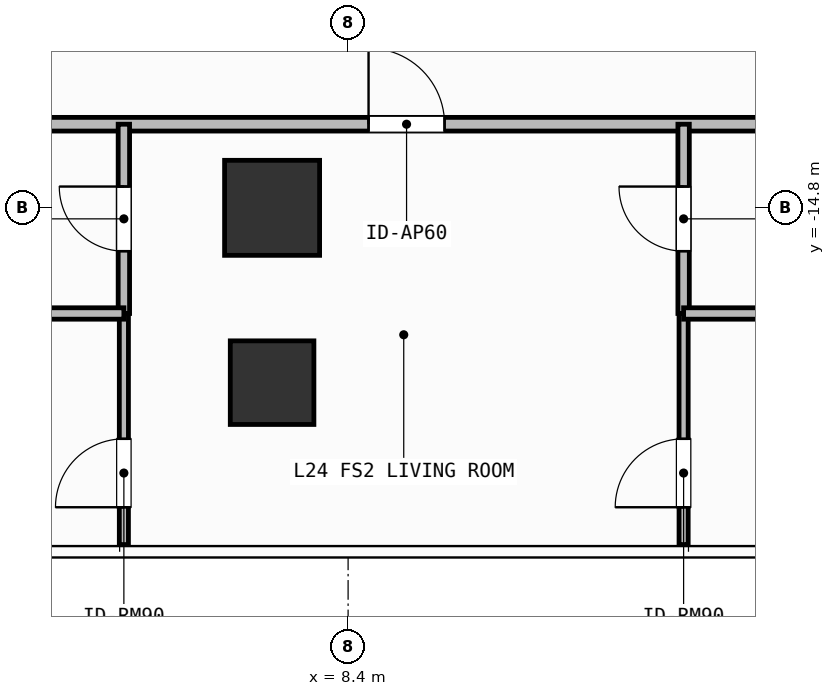
"""IFC4 building model, lengths in metres.
Left out: names, types, materials, properties, quantities, classifications, styles, units other than length and angle.
Written with IfcOpenShell. Run it as: python <this file> out.ifc"""

import sys

from ifc_helpers import new_model, si_unit, direction, frame, frame_2d, origin, origin_2d, place, context, subcontext, project, spatial, rectangle, extrude, element, fill, save


model = new_model("IFC4")
c1 = context("Model", 3, precision=1e-05, world=origin(), true_north=direction((0.0, 1.0)))
c2 = subcontext(c1, "Body", "Model", "MODEL_VIEW")
j1 = project(units=[si_unit("LENGTHUNIT", "METRE"), si_unit("PLANEANGLEUNIT", "RADIAN")], contexts=[c1])
p1 = place(None, origin())
s1 = spatial("IfcSite", under=j1, at=p1, CompositionType="ELEMENT")
p2 = place(p1, origin())
s2 = spatial("IfcBuilding", under=s1, at=p2, CompositionType="ELEMENT")
p3 = place(p2, frame((0.0, 0.0, 96.9)))
s3 = spatial("IfcBuildingStorey", under=s2, at=p3, CompositionType="ELEMENT", Elevation=96.9)
p4 = place(p3, frame((7.4, -14.8, 0.0), z_axis=(0.0, 0.0, 1.0), x_axis=(1.0, 0.0, 0.0)))
e1 = element("IfcColumn", 1, at=p4, inside=s3, PredefinedType="COLUMN", context=c2, shape_type="SweptSolid", body=[
    extrude(rectangle(XDim=1.25, YDim=1.25, at=origin_2d()), origin(), (0.0, 0.0, 1.0), 3.9),
])
p5 = place(p3, frame((7.4, -17.1, 0.0), z_axis=(0.0, 0.0, 1.0), x_axis=(1.0, 0.0, 0.0)))
e2 = element("IfcColumn", 2, at=p5, inside=s3, PredefinedType="COLUMN", context=c2, shape_type="SweptSolid", body=[
    extrude(rectangle(XDim=1.1, YDim=1.1, at=origin_2d()), origin(), (0.0, 0.0, 1.0), 3.9),
])
p6 = place(p3, frame((0.974, -13.7, 0.0), z_axis=(0.0, 0.0, 1.0), x_axis=(1.0, 0.0, 0.0)))
e3 = element("IfcWall", 3, at=p6, inside=s3, PredefinedType="PARTITIONING", context=c2, shape_type="SweptSolid", body=[
    extrude(rectangle(XDim=17.646, YDim=0.18, at=frame_2d((8.823, 0.0))), origin(), (0.0, 0.0, 1.0), 3.68),
])
p7 = place(p6, frame((7.695, 0.0, 0.0)))
e4 = element("IfcOpeningElement", 4, at=p7, cuts=e3, PredefinedType="OPENING", context=c2, shape_type="SweptSolid", body=[
    extrude(rectangle(XDim=1.0, YDim=2.2, at=frame_2d((0.5, 1.1))), frame((0.0, 0.1, 0.0), z_axis=(0.0, -1.0, 0.0), x_axis=(1.0, 0.0, 0.0)), (0.0, 0.0, 1.0), 0.2),
])
p8 = place(p3, frame((5.45, -16.19, 0.0), z_axis=(0.0, 0.0, 1.0), x_axis=(0.0, 1.0, 0.0)))
e5 = element("IfcWall", 5, at=p8, inside=s3, PredefinedType="PARTITIONING", context=c2, shape_type="SweptSolid", body=[
    extrude(rectangle(XDim=2.49, YDim=0.15, at=frame_2d((1.245, 0.0))), origin(), (0.0, 0.0, 1.0), 3.68),
])
p9 = place(p8, frame((0.82, 0.0, 0.0)))
e6 = element("IfcOpeningElement", 6, at=p9, cuts=e5, PredefinedType="OPENING", context=c2, shape_type="SweptSolid", body=[
    extrude(rectangle(XDim=0.85, YDim=2.1, at=frame_2d((0.425, 1.05))), frame((0.0, 0.085, 0.0), z_axis=(0.0, -1.0, 0.0), x_axis=(1.0, 0.0, 0.0)), (0.0, 0.0, 1.0), 0.17),
])
p10 = place(p3, frame((5.45, -19.23, 0.0), z_axis=(0.0, 0.0, 1.0), x_axis=(0.0, 1.0, 0.0)))
e7 = element("IfcWall", 7, at=p10, inside=s3, PredefinedType="PARTITIONING", context=c2, shape_type="SweptSolid", body=[
    extrude(rectangle(XDim=3.04, YDim=0.12, at=frame_2d((1.52, 0.0))), origin(), (0.0, 0.0, 1.0), 3.68),
])
p11 = place(p10, frame((0.491, 0.0, 0.0)))
e8 = element("IfcOpeningElement", 8, at=p11, cuts=e7, PredefinedType="OPENING", context=c2, shape_type="SweptSolid", body=[
    extrude(rectangle(XDim=0.9, YDim=2.1, at=frame_2d((0.45, 1.05))), frame((0.0, 0.07, 0.0), z_axis=(0.0, -1.0, 0.0), x_axis=(1.0, 0.0, 0.0)), (0.0, 0.0, 1.0), 0.14),
])
p12 = place(p3, frame((12.814, -16.19, 0.0), z_axis=(0.0, 0.0, 1.0), x_axis=(0.0, 1.0, 0.0)))
e9 = element("IfcWall", 9, at=p12, inside=s3, PredefinedType="PARTITIONING", context=c2, shape_type="SweptSolid", body=[
    extrude(rectangle(XDim=2.49, YDim=0.15, at=frame_2d((1.245, 0.0))), origin(), (0.0, 0.0, 1.0), 3.68),
])
p13 = place(p12, frame((0.82, 0.0, 0.0)))
e10 = element("IfcOpeningElement", 10, at=p13, cuts=e9, PredefinedType="OPENING", context=c2, shape_type="SweptSolid", body=[
    extrude(rectangle(XDim=0.85, YDim=2.1, at=frame_2d((0.425, 1.05))), frame((0.0, 0.085, 0.0), z_axis=(0.0, -1.0, 0.0), x_axis=(1.0, 0.0, 0.0)), (0.0, 0.0, 1.0), 0.17),
])
p14 = place(p3, frame((12.814, -19.23, 0.0), z_axis=(0.0, 0.0, 1.0), x_axis=(0.0, 1.0, 0.0)))
e11 = element("IfcWall", 11, at=p14, inside=s3, PredefinedType="PARTITIONING", context=c2, shape_type="SweptSolid", body=[
    extrude(rectangle(XDim=3.04, YDim=0.12, at=frame_2d((1.52, 0.0))), origin(), (0.0, 0.0, 1.0), 3.68),
])
p15 = place(p14, frame((0.491, 0.0, 0.0)))
e12 = element("IfcOpeningElement", 12, at=p15, cuts=e11, PredefinedType="OPENING", context=c2, shape_type="SweptSolid", body=[
    extrude(rectangle(XDim=0.9, YDim=2.1, at=frame_2d((0.45, 1.05))), frame((0.0, 0.07, 0.0), z_axis=(0.0, -1.0, 0.0), x_axis=(1.0, 0.0, 0.0)), (0.0, 0.0, 1.0), 0.14),
])
p16 = place(p3, frame((0.974, -16.19, 0.0), z_axis=(0.0, 0.0, 1.0), x_axis=(1.0, 0.0, 0.0)))
e13 = element("IfcWall", 13, at=p16, inside=s3, PredefinedType="PARTITIONING", context=c2, shape_type="SweptSolid", body=[
    extrude(rectangle(XDim=4.476, YDim=0.15, at=frame_2d((2.238, 0.0))), origin(), (0.0, 0.0, 1.0), 3.68),
])
p17 = place(p3, frame((12.814, -16.19, 0.0), z_axis=(0.0, 0.0, 1.0), x_axis=(1.0, 0.0, 0.0)))
e14 = element("IfcWall", 14, at=p17, inside=s3, PredefinedType="PARTITIONING", context=c2, shape_type="SweptSolid", body=[
    extrude(rectangle(XDim=5.806, YDim=0.15, at=frame_2d((2.903, 0.0))), origin(), (0.0, 0.0, 1.0), 3.68),
])
p18 = place(p7, origin())
e15 = element("IfcDoor", 15, at=p18, inside=s3, OperationType="SINGLE_SWING_LEFT", PredefinedType="DOOR", context=c2, shape_type="SweptSolid", body=[
    extrude(rectangle(XDim=1.0, YDim=2.2, at=frame_2d((0.5, 1.1))), frame((0.0, 0.025, 0.0), z_axis=(0.0, -1.0, 0.0), x_axis=(1.0, 0.0, 0.0)), (0.0, 0.0, 1.0), 0.05),
])
fill(e4, e15)
p19 = place(p9, origin())
e16 = element("IfcDoor", 16, at=p19, inside=s3, OperationType="SINGLE_SWING_RIGHT", PredefinedType="DOOR", context=c2, shape_type="SweptSolid", body=[
    extrude(rectangle(XDim=0.85, YDim=2.1, at=frame_2d((0.425, 1.05))), frame((0.0, 0.025, 0.0), z_axis=(0.0, -1.0, 0.0), x_axis=(1.0, 0.0, 0.0)), (0.0, 0.0, 1.0), 0.05),
])
fill(e6, e16)
p20 = place(p11, origin())
e17 = element("IfcDoor", 17, at=p20, inside=s3, OperationType="SINGLE_SWING_LEFT", PredefinedType="DOOR", context=c2, shape_type="SweptSolid", body=[
    extrude(rectangle(XDim=0.9, YDim=2.1, at=frame_2d((0.45, 1.05))), frame((0.0, 0.025, 0.0), z_axis=(0.0, -1.0, 0.0), x_axis=(1.0, 0.0, 0.0)), (0.0, 0.0, 1.0), 0.05),
])
fill(e8, e17)
p21 = place(p13, origin())
e18 = element("IfcDoor", 18, at=p21, inside=s3, OperationType="SINGLE_SWING_RIGHT", PredefinedType="DOOR", context=c2, shape_type="SweptSolid", body=[
    extrude(rectangle(XDim=0.85, YDim=2.1, at=frame_2d((0.425, 1.05))), frame((0.0, 0.025, 0.0), z_axis=(0.0, -1.0, 0.0), x_axis=(1.0, 0.0, 0.0)), (0.0, 0.0, 1.0), 0.05),
])
fill(e10, e18)
p22 = place(p15, origin())
e19 = element("IfcDoor", 19, at=p22, inside=s3, OperationType="SINGLE_SWING_LEFT", PredefinedType="DOOR", context=c2, shape_type="SweptSolid", body=[
    extrude(rectangle(XDim=0.9, YDim=2.1, at=frame_2d((0.45, 1.05))), frame((0.0, 0.025, 0.0), z_axis=(0.0, -1.0, 0.0), x_axis=(1.0, 0.0, 0.0)), (0.0, 0.0, 1.0), 0.05),
])
fill(e12, e19)
save(model, sys.argv[1])
